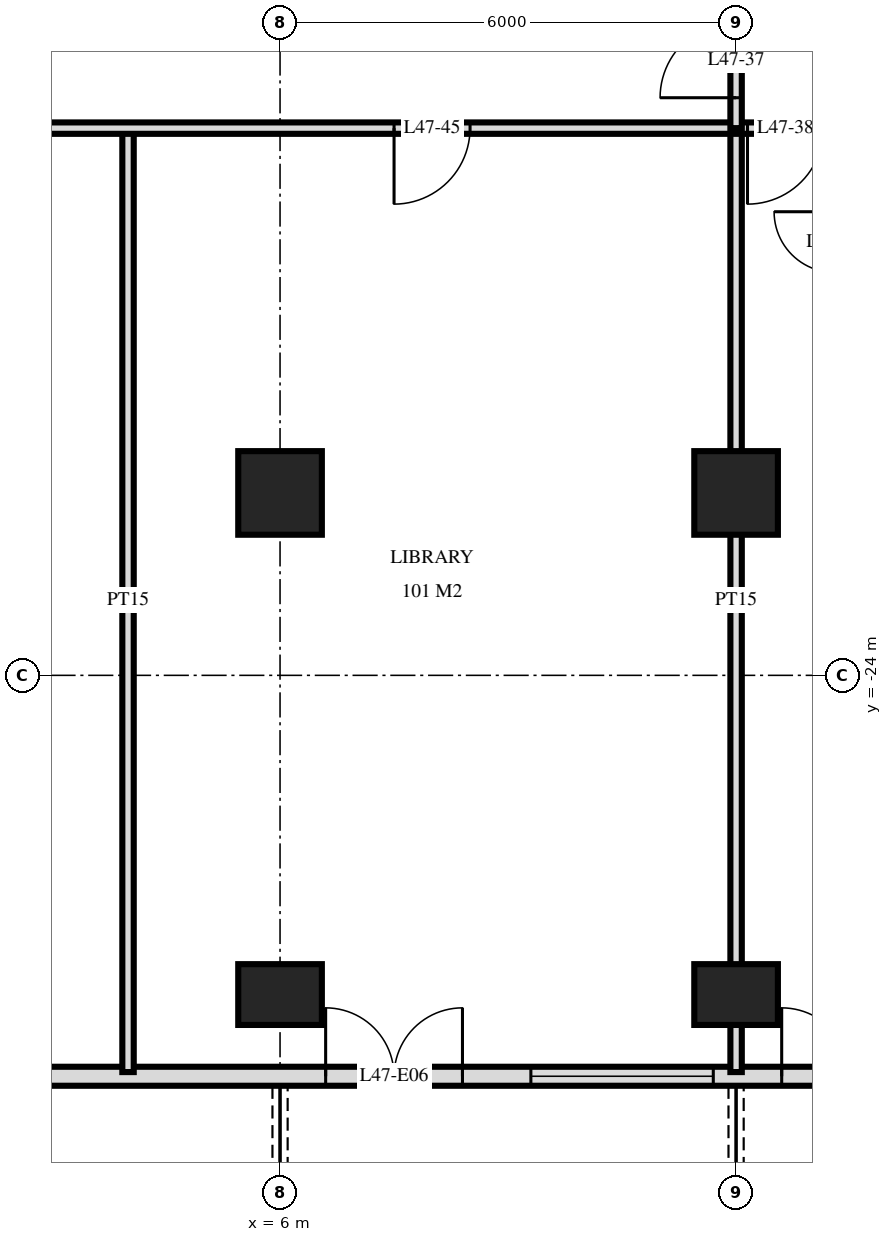
"""IFC4 building model, lengths in metres.
Left out: names, types, materials, properties, quantities, classifications, styles, units other than length and angle.
Written with IfcOpenShell. Run it as: python <this file> out.ifc"""

import sys

from ifc_helpers import new_model, si_unit, direction, frame, frame_2d, origin, origin_2d, place, context, subcontext, project, spatial, rectangle, extrude, element, fill, save


model = new_model("IFC4")
c1 = context("Model", 3, precision=1e-05, world=origin(), true_north=direction((0.0, 1.0)))
c2 = subcontext(c1, "Body", "Model", "MODEL_VIEW")
j1 = project(units=[si_unit("LENGTHUNIT", "METRE"), si_unit("PLANEANGLEUNIT", "RADIAN")], contexts=[c1])
p1 = place(None, origin())
s1 = spatial("IfcSite", under=j1, at=p1, CompositionType="ELEMENT")
p2 = place(p1, origin())
s2 = spatial("IfcBuilding", under=s1, at=p2, CompositionType="ELEMENT")
p3 = place(p2, frame((0.0, 0.0, 183.6)))
s3 = spatial("IfcBuildingStorey", under=s2, at=p3, CompositionType="ELEMENT", Elevation=183.6)
p4 = place(p3, frame((6.0, -28.2, -0.28), z_axis=(0.0, 0.0, 1.0), x_axis=(1.0, 0.0, 0.0)))
e1 = element("IfcColumn", 1, at=p4, inside=s3, PredefinedType="COLUMN", context=c2, shape_type="SweptSolid", body=[
    extrude(rectangle(XDim=1.1, YDim=0.8, at=origin_2d()), origin(), (0.0, 0.0, 1.0), 3.78),
])
p5 = place(p3, frame((6.0, -21.6, -0.28), z_axis=(0.0, 0.0, 1.0), x_axis=(1.0, 0.0, 0.0)))
e2 = element("IfcColumn", 2, at=p5, inside=s3, PredefinedType="COLUMN", context=c2, shape_type="SweptSolid", body=[
    extrude(rectangle(XDim=1.1, YDim=1.1, at=origin_2d()), origin(), (0.0, 0.0, 1.0), 3.78),
])
p6 = place(p3, frame((12.0, -28.2, -0.28), z_axis=(0.0, 0.0, 1.0), x_axis=(1.0, 0.0, 0.0)))
e3 = element("IfcColumn", 3, at=p6, inside=s3, PredefinedType="COLUMN", context=c2, shape_type="SweptSolid", body=[
    extrude(rectangle(XDim=1.1, YDim=0.8, at=origin_2d()), origin(), (0.0, 0.0, 1.0), 3.78),
])
p7 = place(p3, frame((12.0, -21.6, -0.28), z_axis=(0.0, 0.0, 1.0), x_axis=(1.0, 0.0, 0.0)))
e4 = element("IfcColumn", 4, at=p7, inside=s3, PredefinedType="COLUMN", context=c2, shape_type="SweptSolid", body=[
    extrude(rectangle(XDim=1.1, YDim=1.1, at=origin_2d()), origin(), (0.0, 0.0, 1.0), 3.78),
])
p8 = place(p3, frame((-22.475, -29.275, 0.0), z_axis=(0.0, 0.0, 1.0), x_axis=(1.0, 0.0, 0.0)))
e5 = element("IfcWall", 5, at=p8, inside=s3, PredefinedType="SOLIDWALL", context=c2, shape_type="SweptSolid", body=[
    extrude(rectangle(XDim=44.951, YDim=0.25, at=frame_2d((22.475, 0.0))), origin(), (0.0, 0.0, 1.0), 3.22),
])
p9 = place(p8, frame((0.575, 0.0, 0.0)))
e6 = element("IfcOpeningElement", 6, at=p9, cuts=e5, PredefinedType="OPENING", context=c2, shape_type="SweptSolid", body=[
    extrude(rectangle(XDim=1.8, YDim=2.4, at=frame_2d((0.9, 1.2))), frame((0.0, 0.135, 0.0), z_axis=(0.0, -1.0, 0.0), x_axis=(1.0, 0.0, 0.0)), (0.0, 0.0, 1.0), 0.27),
])
p10 = place(p8, frame((4.775, 0.0, 0.9)))
e7 = element("IfcOpeningElement", 7, at=p10, cuts=e5, PredefinedType="OPENING", context=c2, shape_type="SweptSolid", body=[
    extrude(rectangle(XDim=2.4, YDim=1.5, at=frame_2d((1.2, 0.75))), frame((0.0, 0.135, 0.0), z_axis=(0.0, -1.0, 0.0), x_axis=(1.0, 0.0, 0.0)), (0.0, 0.0, 1.0), 0.27),
])
p11 = place(p8, frame((8.075, 0.0, 0.0)))
e8 = element("IfcOpeningElement", 8, at=p11, cuts=e5, PredefinedType="OPENING", context=c2, shape_type="SweptSolid", body=[
    extrude(rectangle(XDim=1.8, YDim=2.4, at=frame_2d((0.9, 1.2))), frame((0.0, 0.135, 0.0), z_axis=(0.0, -1.0, 0.0), x_axis=(1.0, 0.0, 0.0)), (0.0, 0.0, 1.0), 0.27),
])
p12 = place(p8, frame((11.075, 0.0, 0.0)))
e9 = element("IfcOpeningElement", 9, at=p12, cuts=e5, PredefinedType="OPENING", context=c2, shape_type="SweptSolid", body=[
    extrude(rectangle(XDim=1.8, YDim=2.4, at=frame_2d((0.9, 1.2))), frame((0.0, 0.135, 0.0), z_axis=(0.0, -1.0, 0.0), x_axis=(1.0, 0.0, 0.0)), (0.0, 0.0, 1.0), 0.27),
])
p13 = place(p8, frame((13.775, 0.0, 0.9)))
e10 = element("IfcOpeningElement", 10, at=p13, cuts=e5, PredefinedType="OPENING", context=c2, shape_type="SweptSolid", body=[
    extrude(rectangle(XDim=2.4, YDim=1.5, at=frame_2d((1.2, 0.75))), frame((0.0, 0.135, 0.0), z_axis=(0.0, -1.0, 0.0), x_axis=(1.0, 0.0, 0.0)), (0.0, 0.0, 1.0), 0.27),
])
p14 = place(p8, frame((20.075, 0.0, 0.0)))
e11 = element("IfcOpeningElement", 11, at=p14, cuts=e5, PredefinedType="OPENING", context=c2, shape_type="SweptSolid", body=[
    extrude(rectangle(XDim=1.8, YDim=2.4, at=frame_2d((0.9, 1.2))), frame((0.0, 0.135, 0.0), z_axis=(0.0, -1.0, 0.0), x_axis=(1.0, 0.0, 0.0)), (0.0, 0.0, 1.0), 0.27),
])
p15 = place(p8, frame((23.075, 0.0, 0.0)))
e12 = element("IfcOpeningElement", 12, at=p15, cuts=e5, PredefinedType="OPENING", context=c2, shape_type="SweptSolid", body=[
    extrude(rectangle(XDim=1.8, YDim=2.4, at=frame_2d((0.9, 1.2))), frame((0.0, 0.135, 0.0), z_axis=(0.0, -1.0, 0.0), x_axis=(1.0, 0.0, 0.0)), (0.0, 0.0, 1.0), 0.27),
])
p16 = place(p8, frame((29.075, 0.0, 0.0)))
e13 = element("IfcOpeningElement", 13, at=p16, cuts=e5, PredefinedType="OPENING", context=c2, shape_type="SweptSolid", body=[
    extrude(rectangle(XDim=1.8, YDim=2.4, at=frame_2d((0.9, 1.2))), frame((0.0, 0.135, 0.0), z_axis=(0.0, -1.0, 0.0), x_axis=(1.0, 0.0, 0.0)), (0.0, 0.0, 1.0), 0.27),
])
p17 = place(p8, frame((31.775, 0.0, 0.9)))
e14 = element("IfcOpeningElement", 14, at=p17, cuts=e5, PredefinedType="OPENING", context=c2, shape_type="SweptSolid", body=[
    extrude(rectangle(XDim=2.4, YDim=1.5, at=frame_2d((1.2, 0.75))), frame((0.0, 0.135, 0.0), z_axis=(0.0, -1.0, 0.0), x_axis=(1.0, 0.0, 0.0)), (0.0, 0.0, 1.0), 0.27),
])
p18 = place(p8, frame((35.075, 0.0, 0.0)))
e15 = element("IfcOpeningElement", 15, at=p18, cuts=e5, PredefinedType="OPENING", context=c2, shape_type="SweptSolid", body=[
    extrude(rectangle(XDim=1.8, YDim=2.4, at=frame_2d((0.9, 1.2))), frame((0.0, 0.135, 0.0), z_axis=(0.0, -1.0, 0.0), x_axis=(1.0, 0.0, 0.0)), (0.0, 0.0, 1.0), 0.27),
])
p19 = place(p8, frame((37.775, 0.0, 0.9)))
e16 = element("IfcOpeningElement", 16, at=p19, cuts=e5, PredefinedType="OPENING", context=c2, shape_type="SweptSolid", body=[
    extrude(rectangle(XDim=2.4, YDim=1.5, at=frame_2d((1.2, 0.75))), frame((0.0, 0.135, 0.0), z_axis=(0.0, -1.0, 0.0), x_axis=(1.0, 0.0, 0.0)), (0.0, 0.0, 1.0), 0.27),
])
p20 = place(p8, frame((41.075, 0.0, 0.0)))
e17 = element("IfcOpeningElement", 17, at=p20, cuts=e5, PredefinedType="OPENING", context=c2, shape_type="SweptSolid", body=[
    extrude(rectangle(XDim=1.8, YDim=2.4, at=frame_2d((0.9, 1.2))), frame((0.0, 0.135, 0.0), z_axis=(0.0, -1.0, 0.0), x_axis=(1.0, 0.0, 0.0)), (0.0, 0.0, 1.0), 0.27),
])
p21 = place(p3, frame((12.0, -16.8, 0.0), z_axis=(0.0, 0.0, 1.0), x_axis=(0.0, 1.0, 0.0)))
e18 = element("IfcWall", 18, at=p21, inside=s3, PredefinedType="PARTITIONING", context=c2, shape_type="SweptSolid", body=[
    extrude(rectangle(XDim=1.75, YDim=0.15, at=frame_2d((0.875, 0.0))), origin(), (0.0, 0.0, 1.0), 3.22),
])
p22 = place(p21, frame((0.4, 0.0, 0.0)))
e19 = element("IfcOpeningElement", 19, at=p22, cuts=e18, PredefinedType="OPENING", context=c2, shape_type="SweptSolid", body=[
    extrude(rectangle(XDim=1.0, YDim=2.1, at=frame_2d((0.5, 1.05))), frame((0.0, 0.085, 0.0), z_axis=(0.0, -1.0, 0.0), x_axis=(1.0, 0.0, 0.0)), (0.0, 0.0, 1.0), 0.17),
])
for number, where, z_axis, x_axis in (
    (20, (12.0, -29.22, 0.0), (0.0, 0.0, 1.0), (0.0, 1.0, 0.0)),
    (21, (4.0, -29.22, 0.0), (0.0, 0.0, 1.0), (0.0, 1.0, 0.0)),
):
    element("IfcWall", number, at=place(p3, frame(where, z_axis=z_axis, x_axis=x_axis)), inside=s3, PredefinedType="PARTITIONING", context=c2, shape_type="SweptSolid", body=[
        extrude(rectangle(XDim=12.42, YDim=0.15, at=frame_2d((6.21, 0.0))), origin(), (0.0, 0.0, 1.0), 3.22),
    ])
p23 = place(p3, frame((-26.82, -16.8, 0.0), z_axis=(0.0, 0.0, 1.0), x_axis=(1.0, 0.0, 0.0)))
e22 = element("IfcWall", 22, at=p23, inside=s3, PredefinedType="PARTITIONING", context=c2, shape_type="SweptSolid", body=[
    extrude(rectangle(XDim=53.64, YDim=0.15, at=frame_2d((26.82, 0.0))), origin(), (0.0, 0.0, 1.0), 3.22),
])
p24 = place(p23, frame((11.97, 0.0, 0.0)))
e23 = element("IfcOpeningElement", 23, at=p24, cuts=e22, PredefinedType="OPENING", context=c2, shape_type="SweptSolid", body=[
    extrude(rectangle(XDim=1.0, YDim=2.1, at=frame_2d((0.5, 1.05))), frame((0.0, 0.085, 0.0), z_axis=(0.0, -1.0, 0.0), x_axis=(1.0, 0.0, 0.0)), (0.0, 0.0, 1.0), 0.17),
])
p25 = place(p23, frame((10.67, 0.0, 0.0)))
e24 = element("IfcOpeningElement", 24, at=p25, cuts=e22, PredefinedType="OPENING", context=c2, shape_type="SweptSolid", body=[
    extrude(rectangle(XDim=1.0, YDim=2.1, at=frame_2d((0.5, 1.05))), frame((0.0, 0.085, 0.0), z_axis=(0.0, -1.0, 0.0), x_axis=(1.0, 0.0, 0.0)), (0.0, 0.0, 1.0), 0.17),
])
p26 = place(p23, frame((3.22, 0.0, 0.0)))
e25 = element("IfcOpeningElement", 25, at=p26, cuts=e22, PredefinedType="OPENING", context=c2, shape_type="SweptSolid", body=[
    extrude(rectangle(XDim=1.0, YDim=2.1, at=frame_2d((0.5, 1.05))), frame((0.0, 0.085, 0.0), z_axis=(0.0, -1.0, 0.0), x_axis=(1.0, 0.0, 0.0)), (0.0, 0.0, 1.0), 0.17),
])
p27 = place(p23, frame((5.02, 0.0, 0.0)))
e26 = element("IfcOpeningElement", 26, at=p27, cuts=e22, PredefinedType="OPENING", context=c2, shape_type="SweptSolid", body=[
    extrude(rectangle(XDim=1.0, YDim=2.1, at=frame_2d((0.5, 1.05))), frame((0.0, 0.085, 0.0), z_axis=(0.0, -1.0, 0.0), x_axis=(1.0, 0.0, 0.0)), (0.0, 0.0, 1.0), 0.17),
])
p28 = place(p23, frame((38.97, 0.0, 0.0)))
e27 = element("IfcOpeningElement", 27, at=p28, cuts=e22, PredefinedType="OPENING", context=c2, shape_type="SweptSolid", body=[
    extrude(rectangle(XDim=1.0, YDim=2.1, at=frame_2d((0.5, 1.05))), frame((0.0, 0.085, 0.0), z_axis=(0.0, -1.0, 0.0), x_axis=(1.0, 0.0, 0.0)), (0.0, 0.0, 1.0), 0.17),
])
p29 = place(p23, frame((48.72, 0.0, 0.0)))
e28 = element("IfcOpeningElement", 28, at=p29, cuts=e22, PredefinedType="OPENING", context=c2, shape_type="SweptSolid", body=[
    extrude(rectangle(XDim=1.0, YDim=2.1, at=frame_2d((0.5, 1.05))), frame((0.0, 0.085, 0.0), z_axis=(0.0, -1.0, 0.0), x_axis=(1.0, 0.0, 0.0)), (0.0, 0.0, 1.0), 0.17),
])
p30 = place(p23, frame((46.92, 0.0, 0.0)))
e29 = element("IfcOpeningElement", 29, at=p30, cuts=e22, PredefinedType="OPENING", context=c2, shape_type="SweptSolid", body=[
    extrude(rectangle(XDim=1.0, YDim=2.1, at=frame_2d((0.5, 1.05))), frame((0.0, 0.085, 0.0), z_axis=(0.0, -1.0, 0.0), x_axis=(1.0, 0.0, 0.0)), (0.0, 0.0, 1.0), 0.17),
])
p31 = place(p23, frame((18.32, 0.0, 0.0)))
e30 = element("IfcOpeningElement", 30, at=p31, cuts=e22, PredefinedType="OPENING", context=c2, shape_type="SweptSolid", body=[
    extrude(rectangle(XDim=1.0, YDim=2.1, at=frame_2d((0.5, 1.05))), frame((0.0, 0.085, 0.0), z_axis=(0.0, -1.0, 0.0), x_axis=(1.0, 0.0, 0.0)), (0.0, 0.0, 1.0), 0.17),
])
p32 = place(p23, frame((26.32, 0.0, 0.0)))
e31 = element("IfcOpeningElement", 31, at=p32, cuts=e22, PredefinedType="OPENING", context=c2, shape_type="SweptSolid", body=[
    extrude(rectangle(XDim=1.0, YDim=2.1, at=frame_2d((0.5, 1.05))), frame((0.0, 0.085, 0.0), z_axis=(0.0, -1.0, 0.0), x_axis=(1.0, 0.0, 0.0)), (0.0, 0.0, 1.0), 0.17),
])
p33 = place(p23, frame((34.32, 0.0, 0.0)))
e32 = element("IfcOpeningElement", 32, at=p33, cuts=e22, PredefinedType="OPENING", context=c2, shape_type="SweptSolid", body=[
    extrude(rectangle(XDim=1.0, YDim=2.1, at=frame_2d((0.5, 1.05))), frame((0.0, 0.085, 0.0), z_axis=(0.0, -1.0, 0.0), x_axis=(1.0, 0.0, 0.0)), (0.0, 0.0, 1.0), 0.17),
])
p34 = place(p16, origin())
e33 = element("IfcDoor", 33, at=p34, inside=s3, OperationType="DOUBLE_DOOR_SINGLE_SWING", PredefinedType="DOOR", context=c2, shape_type="SweptSolid", body=[
    extrude(rectangle(XDim=1.8, YDim=2.4, at=frame_2d((0.9, 1.2))), frame((0.0, 0.025, 0.0), z_axis=(0.0, -1.0, 0.0), x_axis=(1.0, 0.0, 0.0)), (0.0, 0.0, 1.0), 0.05),
])
fill(e13, e33)
p35 = place(p17, origin())
e34 = element("IfcWindow", 34, at=p35, inside=s3, PartitioningType="SINGLE_PANEL", PredefinedType="WINDOW", context=c2, shape_type="SweptSolid", body=[
    extrude(rectangle(XDim=2.4, YDim=1.5, at=frame_2d((1.2, 0.75))), frame((0.0, 0.03, 0.0), z_axis=(0.0, -1.0, 0.0), x_axis=(1.0, 0.0, 0.0)), (0.0, 0.0, 1.0), 0.06),
])
fill(e14, e34)
p36 = place(p18, origin())
e35 = element("IfcDoor", 35, at=p36, inside=s3, OperationType="DOUBLE_DOOR_SINGLE_SWING", PredefinedType="DOOR", context=c2, shape_type="SweptSolid", body=[
    extrude(rectangle(XDim=1.8, YDim=2.4, at=frame_2d((0.9, 1.2))), frame((0.0, 0.025, 0.0), z_axis=(0.0, -1.0, 0.0), x_axis=(1.0, 0.0, 0.0)), (0.0, 0.0, 1.0), 0.05),
])
fill(e15, e35)
p37 = place(p22, origin())
e36 = element("IfcDoor", 36, at=p37, inside=s3, OperationType="SINGLE_SWING_RIGHT", PredefinedType="DOOR", context=c2, shape_type="SweptSolid", body=[
    extrude(rectangle(XDim=1.0, YDim=2.1, at=frame_2d((0.5, 1.05))), frame((0.0, 0.025, 0.0), z_axis=(0.0, -1.0, 0.0), x_axis=(1.0, 0.0, 0.0)), (0.0, 0.0, 1.0), 0.05),
])
fill(e19, e36)
p38 = place(p28, frame((0.5, 0.0, 0.0), z_axis=(0.0, 0.0, 1.0), x_axis=(-1.0, 0.0, 0.0)))
e37 = element("IfcDoor", 37, at=p38, inside=s3, OperationType="SINGLE_SWING_LEFT", PredefinedType="DOOR", context=c2, shape_type="SweptSolid", body=[
    extrude(rectangle(XDim=1.0, YDim=2.1, at=frame_2d((0.0, 1.05))), frame((0.0, -0.025, 0.0), z_axis=(0.0, 1.0, 0.0), x_axis=(-1.0, 0.0, 0.0)), (0.0, 0.0, 1.0), 0.05),
])
fill(e27, e37)
p39 = place(p33, frame((0.5, 0.0, 0.0), z_axis=(0.0, 0.0, 1.0), x_axis=(-1.0, 0.0, 0.0)))
e38 = element("IfcDoor", 38, at=p39, inside=s3, OperationType="SINGLE_SWING_LEFT", PredefinedType="DOOR", context=c2, shape_type="SweptSolid", body=[
    extrude(rectangle(XDim=1.0, YDim=2.1, at=frame_2d((0.0, 1.05))), frame((0.0, -0.025, 0.0), z_axis=(0.0, 1.0, 0.0), x_axis=(-1.0, 0.0, 0.0)), (0.0, 0.0, 1.0), 0.05),
])
fill(e32, e38)
save(model, sys.argv[1])
